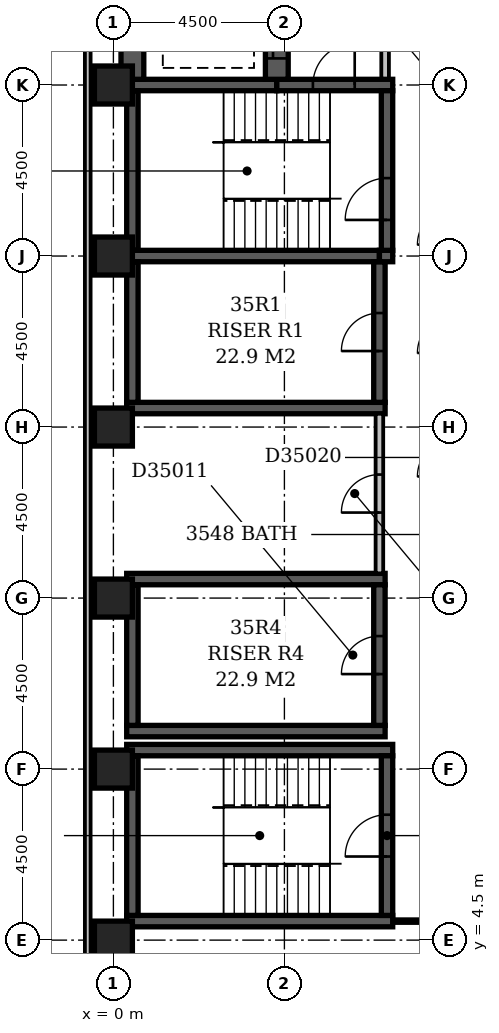
"""IFC4 building model, lengths in metres.
Left out: names, types, materials, properties, quantities, classifications, styles, units other than length and angle.
Written with IfcOpenShell. Run it as: python <this file> out.ifc"""

import sys

from ifc_helpers import new_model, si_unit, direction, frame, frame_2d, origin, origin_2d, place, context, subcontext, project, spatial, rectangle, extrude, element, fill, save


model = new_model("IFC4")
c1 = context("Model", 3, precision=1e-05, world=origin(), true_north=direction((0.0, 1.0)))
c2 = subcontext(c1, "Body", "Model", "MODEL_VIEW")
j1 = project(units=[si_unit("LENGTHUNIT", "METRE"), si_unit("PLANEANGLEUNIT", "RADIAN")], contexts=[c1])
p1 = place(None, origin())
s1 = spatial("IfcSite", under=j1, at=p1, CompositionType="ELEMENT")
p2 = place(p1, origin())
s2 = spatial("IfcBuilding", under=s1, at=p2, CompositionType="ELEMENT")
p3 = place(p2, frame((0.0, 0.0, 141.2)))
s3 = spatial("IfcBuildingStorey", under=s2, at=p3, CompositionType="ELEMENT", Elevation=141.2)
for number, where, z_axis, x_axis in (
    (1, (0.35, 5.0, -0.3), (0.0, 0.0, 1.0), (1.0, 0.0, 0.0)),
    (2, (0.35, 9.5, -0.3), (0.0, 0.0, 1.0), (1.0, 0.0, 0.0)),
):
    element("IfcWall", number, at=place(p3, frame(where, z_axis=z_axis, x_axis=x_axis)), inside=s3, PredefinedType="SHEAR", context=c2, shape_type="SweptSolid", body=[
        extrude(rectangle(XDim=7.0, YDim=0.3, at=frame_2d((3.5, 0.0))), origin(), (0.0, 0.0, 1.0), 3.6),
    ])
for number, where, z_axis, x_axis in (
    (3, (0.35, 10.0, -0.3), (0.0, 0.0, 1.0), (1.0, 0.0, 0.0)),
    (4, (0.35, 14.0, -0.3), (0.0, 0.0, 1.0), (1.0, 0.0, 0.0)),
    (5, (0.35, 18.5, -0.3), (0.0, 0.0, 1.0), (1.0, 0.0, 0.0)),
):
    element("IfcWall", number, at=place(p3, frame(where, z_axis=z_axis, x_axis=x_axis)), inside=s3, PredefinedType="SHEAR", context=c2, shape_type="SweptSolid", body=[
        extrude(rectangle(XDim=6.8, YDim=0.3, at=frame_2d((3.4, 0.0))), origin(), (0.0, 0.0, 1.0), 3.6),
    ])
p4 = place(p3, frame((0.35, 22.5, -0.3), z_axis=(0.0, 0.0, 1.0), x_axis=(1.0, 0.0, 0.0)))
e6 = element("IfcWall", 6, at=p4, inside=s3, PredefinedType="SHEAR", context=c2, shape_type="SweptSolid", body=[
    extrude(rectangle(XDim=6.65, YDim=0.3, at=frame_2d((3.325, 0.0))), origin(), (0.0, 0.0, 1.0), 3.6),
])
p5 = place(p3, frame((0.35, 27.0, -0.3), z_axis=(0.0, 0.0, 1.0), x_axis=(1.0, 0.0, 0.0)))
e7 = element("IfcWall", 7, at=p5, inside=s3, PredefinedType="SHEAR", context=c2, shape_type="SweptSolid", body=[
    extrude(rectangle(XDim=3.95, YDim=0.3, at=frame_2d((1.975, 0.0))), origin(), (0.0, 0.0, 1.0), 3.6),
])
p6 = place(p3, frame((0.5, 5.15, -0.3), z_axis=(0.0, 0.0, 1.0), x_axis=(0.0, 1.0, 0.0)))
e8 = element("IfcWall", 8, at=p6, inside=s3, PredefinedType="SHEAR", context=c2, shape_type="SweptSolid", body=[
    extrude(rectangle(XDim=4.2, YDim=0.3, at=frame_2d((2.1, 0.0))), origin(), (0.0, 0.0, 1.0), 3.6),
])
for number, where, z_axis, x_axis in (
    (9, (0.5, 10.15, -0.3), (0.0, 0.0, 1.0), (0.0, 1.0, 0.0)),
    (10, (0.5, 18.65, -0.3), (0.0, 0.0, 1.0), (0.0, 1.0, 0.0)),
):
    element("IfcWall", number, at=place(p3, frame(where, z_axis=z_axis, x_axis=x_axis)), inside=s3, PredefinedType="SHEAR", context=c2, shape_type="SweptSolid", body=[
        extrude(rectangle(XDim=3.7, YDim=0.3, at=frame_2d((1.85, 0.0))), origin(), (0.0, 0.0, 1.0), 3.6),
    ])
p7 = place(p3, frame((0.5, 22.65, -0.3), z_axis=(0.0, 0.0, 1.0), x_axis=(0.0, 1.0, 0.0)))
e11 = element("IfcWall", 11, at=p7, inside=s3, PredefinedType="SHEAR", context=c2, shape_type="SweptSolid", body=[
    extrude(rectangle(XDim=4.2, YDim=0.3, at=frame_2d((2.1, 0.0))), origin(), (0.0, 0.0, 1.0), 3.6),
])
p8 = place(p3, frame((0.5, 27.15, -0.3), z_axis=(0.0, 0.0, 1.0), x_axis=(0.0, 1.0, 0.0)))
e12 = element("IfcWall", 12, at=p8, inside=s3, PredefinedType="SHEAR", context=c2, shape_type="SweptSolid", body=[
    extrude(rectangle(XDim=22.05, YDim=0.6, at=frame_2d((11.025, 0.0))), origin(), (0.0, 0.0, 1.0), 3.6),
])
p9 = place(p3, frame((4.3, 27.0, -0.3), z_axis=(0.0, 0.0, 1.0), x_axis=(1.0, 0.0, 0.0)))
e13 = element("IfcWall", 13, at=p9, inside=s3, PredefinedType="SHEAR", context=c2, shape_type="SweptSolid", body=[
    extrude(rectangle(XDim=3.05, YDim=0.3, at=frame_2d((1.525, 0.0))), origin(), (0.0, 0.0, 1.0), 3.6),
])
p10 = place(p9, frame((0.95, 0.0, 0.3)))
e14 = element("IfcOpeningElement", 14, at=p10, cuts=e13, PredefinedType="OPENING", context=c2, shape_type="SweptSolid", body=[
    extrude(rectangle(XDim=1.1, YDim=2.1, at=frame_2d((0.55, 1.05))), frame((0.0, 0.162, 0.0), z_axis=(0.0, -1.0, 0.0), x_axis=(1.0, 0.0, 0.0)), (0.0, 0.0, 1.0), 0.324),
])
p11 = place(p3, frame((4.3, 27.15, -0.3), z_axis=(0.0, 0.0, 1.0), x_axis=(0.0, 1.0, 0.0)))
e15 = element("IfcWall", 15, at=p11, inside=s3, PredefinedType="SHEAR", context=c2, shape_type="SweptSolid", body=[
    extrude(rectangle(XDim=22.05, YDim=0.6, at=frame_2d((11.025, 0.0))), origin(), (0.0, 0.0, 1.0), 3.6),
])
p12 = place(p11, frame((3.05, 0.0, 0.3)))
e16 = element("IfcOpeningElement", 16, at=p12, cuts=e15, PredefinedType="OPENING", context=c2, shape_type="SweptSolid", body=[
    extrude(rectangle(XDim=1.1, YDim=2.1, at=frame_2d((0.55, 1.05))), frame((0.0, 0.312, 0.0), z_axis=(0.0, -1.0, 0.0), x_axis=(1.0, 0.0, 0.0)), (0.0, 0.0, 1.0), 0.624),
])
p13 = place(p11, frame((0.55, 0.0, 0.3)))
e17 = element("IfcOpeningElement", 17, at=p13, cuts=e15, PredefinedType="OPENING", context=c2, shape_type="SweptSolid", body=[
    extrude(rectangle(XDim=1.1, YDim=2.1, at=frame_2d((0.55, 1.05))), frame((0.0, 0.312, 0.0), z_axis=(0.0, -1.0, 0.0), x_axis=(1.0, 0.0, 0.0)), (0.0, 0.0, 1.0), 0.624),
])
p14 = place(p11, frame((20.55, 0.0, 0.3)))
e18 = element("IfcOpeningElement", 18, at=p14, cuts=e15, PredefinedType="OPENING", context=c2, shape_type="SweptSolid", body=[
    extrude(rectangle(XDim=1.1, YDim=2.1, at=frame_2d((0.55, 1.05))), frame((0.0, 0.312, 0.0), z_axis=(0.0, -1.0, 0.0), x_axis=(1.0, 0.0, 0.0)), (0.0, 0.0, 1.0), 0.624),
])
p15 = place(p11, frame((18.05, 0.0, 0.3)))
e19 = element("IfcOpeningElement", 19, at=p15, cuts=e15, PredefinedType="OPENING", context=c2, shape_type="SweptSolid", body=[
    extrude(rectangle(XDim=1.1, YDim=2.1, at=frame_2d((0.55, 1.05))), frame((0.0, 0.312, 0.0), z_axis=(0.0, -1.0, 0.0), x_axis=(1.0, 0.0, 0.0)), (0.0, 0.0, 1.0), 0.624),
])
p16 = place(p11, frame((15.55, 0.0, 0.3)))
e20 = element("IfcOpeningElement", 20, at=p16, cuts=e15, PredefinedType="OPENING", context=c2, shape_type="SweptSolid", body=[
    extrude(rectangle(XDim=1.1, YDim=2.1, at=frame_2d((0.55, 1.05))), frame((0.0, 0.312, 0.0), z_axis=(0.0, -1.0, 0.0), x_axis=(1.0, 0.0, 0.0)), (0.0, 0.0, 1.0), 0.624),
])
p17 = place(p11, frame((13.05, 0.0, 0.3)))
e21 = element("IfcOpeningElement", 21, at=p17, cuts=e15, PredefinedType="OPENING", context=c2, shape_type="SweptSolid", body=[
    extrude(rectangle(XDim=1.1, YDim=2.1, at=frame_2d((0.55, 1.05))), frame((0.0, 0.312, 0.0), z_axis=(0.0, -1.0, 0.0), x_axis=(1.0, 0.0, 0.0)), (0.0, 0.0, 1.0), 0.624),
])
p18 = place(p11, frame((10.55, 0.0, 0.3)))
e22 = element("IfcOpeningElement", 22, at=p18, cuts=e15, PredefinedType="OPENING", context=c2, shape_type="SweptSolid", body=[
    extrude(rectangle(XDim=1.1, YDim=2.1, at=frame_2d((0.55, 1.05))), frame((0.0, 0.312, 0.0), z_axis=(0.0, -1.0, 0.0), x_axis=(1.0, 0.0, 0.0)), (0.0, 0.0, 1.0), 0.624),
])
p19 = place(p11, frame((8.05, 0.0, 0.3)))
e23 = element("IfcOpeningElement", 23, at=p19, cuts=e15, PredefinedType="OPENING", context=c2, shape_type="SweptSolid", body=[
    extrude(rectangle(XDim=1.1, YDim=2.1, at=frame_2d((0.55, 1.05))), frame((0.0, 0.312, 0.0), z_axis=(0.0, -1.0, 0.0), x_axis=(1.0, 0.0, 0.0)), (0.0, 0.0, 1.0), 0.624),
])
p20 = place(p11, frame((5.55, 0.0, 0.3)))
e24 = element("IfcOpeningElement", 24, at=p20, cuts=e15, PredefinedType="OPENING", context=c2, shape_type="SweptSolid", body=[
    extrude(rectangle(XDim=1.1, YDim=2.1, at=frame_2d((0.55, 1.05))), frame((0.0, 0.312, 0.0), z_axis=(0.0, -1.0, 0.0), x_axis=(1.0, 0.0, 0.0)), (0.0, 0.0, 1.0), 0.624),
])
p21 = place(p3, frame((7.0, 10.15, -0.3), z_axis=(0.0, 0.0, 1.0), x_axis=(0.0, 1.0, 0.0)))
e25 = element("IfcWall", 25, at=p21, inside=s3, PredefinedType="SHEAR", context=c2, shape_type="SweptSolid", body=[
    extrude(rectangle(XDim=3.7, YDim=0.3, at=frame_2d((1.85, 0.0))), origin(), (0.0, 0.0, 1.0), 3.6),
])
p22 = place(p21, frame((1.35, 0.0, 0.3)))
e26 = element("IfcOpeningElement", 26, at=p22, cuts=e25, PredefinedType="OPENING", context=c2, shape_type="SweptSolid", body=[
    extrude(rectangle(XDim=1.0, YDim=2.1, at=frame_2d((0.5, 1.05))), frame((0.0, 0.162, 0.0), z_axis=(0.0, -1.0, 0.0), x_axis=(1.0, 0.0, 0.0)), (0.0, 0.0, 1.0), 0.324),
])
p23 = place(p3, frame((7.0, 18.65, -0.3), z_axis=(0.0, 0.0, 1.0), x_axis=(0.0, 1.0, 0.0)))
e27 = element("IfcWall", 27, at=p23, inside=s3, PredefinedType="SHEAR", context=c2, shape_type="SweptSolid", body=[
    extrude(rectangle(XDim=3.7, YDim=0.3, at=frame_2d((1.85, 0.0))), origin(), (0.0, 0.0, 1.0), 3.6),
])
p24 = place(p23, frame((1.35, 0.0, 0.3)))
e28 = element("IfcOpeningElement", 28, at=p24, cuts=e27, PredefinedType="OPENING", context=c2, shape_type="SweptSolid", body=[
    extrude(rectangle(XDim=1.0, YDim=2.1, at=frame_2d((0.5, 1.05))), frame((0.0, 0.162, 0.0), z_axis=(0.0, -1.0, 0.0), x_axis=(1.0, 0.0, 0.0)), (0.0, 0.0, 1.0), 0.324),
])
p25 = place(p3, frame((7.0, 22.5, -0.3), z_axis=(0.0, 0.0, 1.0), x_axis=(1.0, 0.0, 0.0)))
e29 = element("IfcWall", 29, at=p25, inside=s3, PredefinedType="SHEAR", context=c2, shape_type="SweptSolid", body=[
    extrude(rectangle(XDim=0.35, YDim=0.3, at=frame_2d((0.175, 0.0))), origin(), (0.0, 0.0, 1.0), 3.6),
])
p26 = place(p3, frame((7.2, 5.15, -0.3), z_axis=(0.0, 0.0, 1.0), x_axis=(0.0, 1.0, 0.0)))
e30 = element("IfcWall", 30, at=p26, inside=s3, PredefinedType="SHEAR", context=c2, shape_type="SweptSolid", body=[
    extrude(rectangle(XDim=4.2, YDim=0.3, at=frame_2d((2.1, 0.0))), origin(), (0.0, 0.0, 1.0), 3.6),
])
p27 = place(p26, frame((1.55, 0.0, 0.3)))
e31 = element("IfcOpeningElement", 31, at=p27, cuts=e30, PredefinedType="OPENING", context=c2, shape_type="SweptSolid", body=[
    extrude(rectangle(XDim=1.1, YDim=2.1, at=frame_2d((0.55, 1.05))), frame((0.0, 0.162, 0.0), z_axis=(0.0, -1.0, 0.0), x_axis=(1.0, 0.0, 0.0)), (0.0, 0.0, 1.0), 0.324),
])
p28 = place(p3, frame((7.2, 22.65, -0.3), z_axis=(0.0, 0.0, 1.0), x_axis=(0.0, 1.0, 0.0)))
e32 = element("IfcWall", 32, at=p28, inside=s3, PredefinedType="SHEAR", context=c2, shape_type="SweptSolid", body=[
    extrude(rectangle(XDim=4.2, YDim=0.3, at=frame_2d((2.1, 0.0))), origin(), (0.0, 0.0, 1.0), 3.6),
])
p29 = place(p28, frame((0.8, 0.0, 0.3)))
e33 = element("IfcOpeningElement", 33, at=p29, cuts=e32, PredefinedType="OPENING", context=c2, shape_type="SweptSolid", body=[
    extrude(rectangle(XDim=1.1, YDim=2.1, at=frame_2d((0.55, 1.05))), frame((0.0, 0.162, 0.0), z_axis=(0.0, -1.0, 0.0), x_axis=(1.0, 0.0, 0.0)), (0.0, 0.0, 1.0), 0.324),
])
for number, where, z_axis, x_axis in (
    (34, (0.0, 4.5, -0.3), (0.0, 0.0, 1.0), (1.0, 0.0, 0.0)),
    (35, (0.0, 9.0, -0.3), (0.0, 0.0, 1.0), (1.0, 0.0, 0.0)),
    (36, (0.0, 13.5, -0.3), (0.0, 0.0, 1.0), (1.0, 0.0, 0.0)),
    (37, (0.0, 18.0, -0.3), (0.0, 0.0, 1.0), (1.0, 0.0, 0.0)),
    (38, (0.0, 22.5, -0.3), (0.0, 0.0, 1.0), (1.0, 0.0, 0.0)),
    (39, (0.0, 27.0, -0.3), (0.0, 0.0, 1.0), (1.0, 0.0, 0.0)),
):
    element("IfcColumn", number, at=place(p3, frame(where, z_axis=z_axis, x_axis=x_axis)), inside=s3, PredefinedType="COLUMN", context=c2, shape_type="SweptSolid", body=[
        extrude(rectangle(XDim=1.0, YDim=1.0, at=origin_2d()), origin(), (0.0, 0.0, 1.0), 3.6),
    ])
p30 = place(p3, frame((-0.675, 59.1, 0.0), z_axis=(0.0, 0.0, 1.0), x_axis=(0.0, -1.0, 0.0)))
e40 = element("IfcWall", 40, at=p30, inside=s3, PredefinedType="STANDARD", context=c2, shape_type="SweptSolid", body=[
    extrude(rectangle(XDim=55.35, YDim=0.15, at=frame_2d((27.675, 0.0))), origin(), (0.0, 0.0, 1.0), 2.7),
])
p31 = place(p3, frame((7.15, 27.17, 0.0), z_axis=(0.0, 0.0, 1.0), x_axis=(0.0, 1.0, 0.0)))
e41 = element("IfcWall", 41, at=p31, inside=s3, PredefinedType="PARTITIONING", context=c2, shape_type="SweptSolid", body=[
    extrude(rectangle(XDim=4.83, YDim=0.2, at=frame_2d((2.415, 0.0))), origin(), (0.0, 0.0, 1.0), 3.3),
])
p32 = place(p31, frame((1.73, 0.0, 0.0)))
e42 = element("IfcOpeningElement", 42, at=p32, cuts=e41, PredefinedType="OPENING", context=c2, shape_type="SweptSolid", body=[
    extrude(rectangle(XDim=1.2, YDim=2.1, at=frame_2d((0.6, 1.05))), frame((0.0, 0.112, 0.0), z_axis=(0.0, -1.0, 0.0), x_axis=(1.0, 0.0, 0.0)), (0.0, 0.0, 1.0), 0.224),
])
p33 = place(p3, frame((0.0, 4.5, 0.0), z_axis=(0.0, 0.0, 1.0), x_axis=(0.0, 1.0, 0.0)))
e43 = element("IfcWall", 43, at=p33, inside=s3, PredefinedType="PARTITIONING", context=c2, shape_type="SweptSolid", body=[
    extrude(rectangle(XDim=0.5, YDim=0.1, at=frame_2d((0.25, 0.0))), origin(), (0.0, 0.0, 1.0), 2.7),
])
p34 = place(p3, frame((7.349, 5.0, 0.0), z_axis=(0.0, 0.0, 1.0), x_axis=(1.0, 0.0, 0.0)))
e44 = element("IfcWall", 44, at=p34, inside=s3, PredefinedType="PARTITIONING", context=c2, shape_type="SweptSolid", body=[
    extrude(rectangle(XDim=1.551, YDim=0.1, at=frame_2d((0.775, 0.0))), origin(), (0.0, 0.0, 1.0), 3.3),
])
p35 = place(p3, frame((7.0, 14.15, 0.0), z_axis=(0.0, 0.0, 1.0), x_axis=(0.0, 1.0, 0.0)))
e45 = element("IfcWall", 45, at=p35, inside=s3, PredefinedType="PARTITIONING", context=c2, shape_type="SweptSolid", body=[
    extrude(rectangle(XDim=4.2, YDim=0.2, at=frame_2d((2.1, 0.0))), origin(), (0.0, 0.0, 1.0), 3.3),
])
p36 = place(p35, frame((1.6, 0.0, 0.0)))
e46 = element("IfcOpeningElement", 46, at=p36, cuts=e45, PredefinedType="OPENING", context=c2, shape_type="SweptSolid", body=[
    extrude(rectangle(XDim=1.0, YDim=2.1, at=frame_2d((0.5, 1.05))), frame((0.0, 0.112, 0.0), z_axis=(0.0, -1.0, 0.0), x_axis=(1.0, 0.0, 0.0)), (0.0, 0.0, 1.0), 0.224),
])
p37 = place(p13, origin())
e47 = element("IfcDoor", 47, at=p37, inside=s3, OperationType="SLIDING_TO_LEFT", PredefinedType="DOOR", context=c2, shape_type="SweptSolid", body=[
    extrude(rectangle(XDim=1.1, YDim=2.1, at=frame_2d((0.55, 1.05))), frame((0.0, 0.025, 0.0), z_axis=(0.0, -1.0, 0.0), x_axis=(1.0, 0.0, 0.0)), (0.0, 0.0, 1.0), 0.05),
])
fill(e17, e47)
p38 = place(p24, origin())
e48 = element("IfcDoor", 48, at=p38, inside=s3, OperationType="SINGLE_SWING_LEFT", PredefinedType="DOOR", context=c2, shape_type="SweptSolid", body=[
    extrude(rectangle(XDim=1.0, YDim=2.1, at=frame_2d((0.5, 1.05))), frame((0.0, 0.025, 0.0), z_axis=(0.0, -1.0, 0.0), x_axis=(1.0, 0.0, 0.0)), (0.0, 0.0, 1.0), 0.05),
])
fill(e28, e48)
p39 = place(p22, origin())
e49 = element("IfcDoor", 49, at=p39, inside=s3, OperationType="SINGLE_SWING_LEFT", PredefinedType="DOOR", context=c2, shape_type="SweptSolid", body=[
    extrude(rectangle(XDim=1.0, YDim=2.1, at=frame_2d((0.5, 1.05))), frame((0.0, 0.025, 0.0), z_axis=(0.0, -1.0, 0.0), x_axis=(1.0, 0.0, 0.0)), (0.0, 0.0, 1.0), 0.05),
])
fill(e26, e49)
p40 = place(p10, frame((1.1, 0.0, 0.0), z_axis=(0.0, 0.0, 1.0), x_axis=(-1.0, 0.0, 0.0)))
e50 = element("IfcDoor", 50, at=p40, inside=s3, OperationType="SINGLE_SWING_LEFT", PredefinedType="DOOR", context=c2, shape_type="SweptSolid", body=[
    extrude(rectangle(XDim=1.1, YDim=2.1, at=frame_2d((0.55, 1.05))), frame((0.0, 0.025, 0.0), z_axis=(0.0, -1.0, 0.0), x_axis=(1.0, 0.0, 0.0)), (0.0, 0.0, 1.0), 0.05),
])
fill(e14, e50)
p41 = place(p29, origin())
e51 = element("IfcDoor", 51, at=p41, inside=s3, OperationType="SINGLE_SWING_LEFT", PredefinedType="DOOR", context=c2, shape_type="SweptSolid", body=[
    extrude(rectangle(XDim=1.1, YDim=2.1, at=frame_2d((0.55, 1.05))), frame((0.0, 0.025, 0.0), z_axis=(0.0, -1.0, 0.0), x_axis=(1.0, 0.0, 0.0)), (0.0, 0.0, 1.0), 0.05),
])
fill(e33, e51)
p42 = place(p27, origin())
e52 = element("IfcDoor", 52, at=p42, inside=s3, OperationType="SINGLE_SWING_LEFT", PredefinedType="DOOR", context=c2, shape_type="SweptSolid", body=[
    extrude(rectangle(XDim=1.1, YDim=2.1, at=frame_2d((0.55, 1.05))), frame((0.0, 0.025, 0.0), z_axis=(0.0, -1.0, 0.0), x_axis=(1.0, 0.0, 0.0)), (0.0, 0.0, 1.0), 0.05),
])
fill(e31, e52)
p43 = place(p36, origin())
e53 = element("IfcDoor", 53, at=p43, inside=s3, OperationType="SINGLE_SWING_LEFT", PredefinedType="DOOR", context=c2, shape_type="SweptSolid", body=[
    extrude(rectangle(XDim=1.0, YDim=2.1, at=frame_2d((0.5, 1.05))), frame((0.0, 0.025, 0.0), z_axis=(0.0, -1.0, 0.0), x_axis=(1.0, 0.0, 0.0)), (0.0, 0.0, 1.0), 0.05),
])
fill(e46, e53)
save(model, sys.argv[1])
